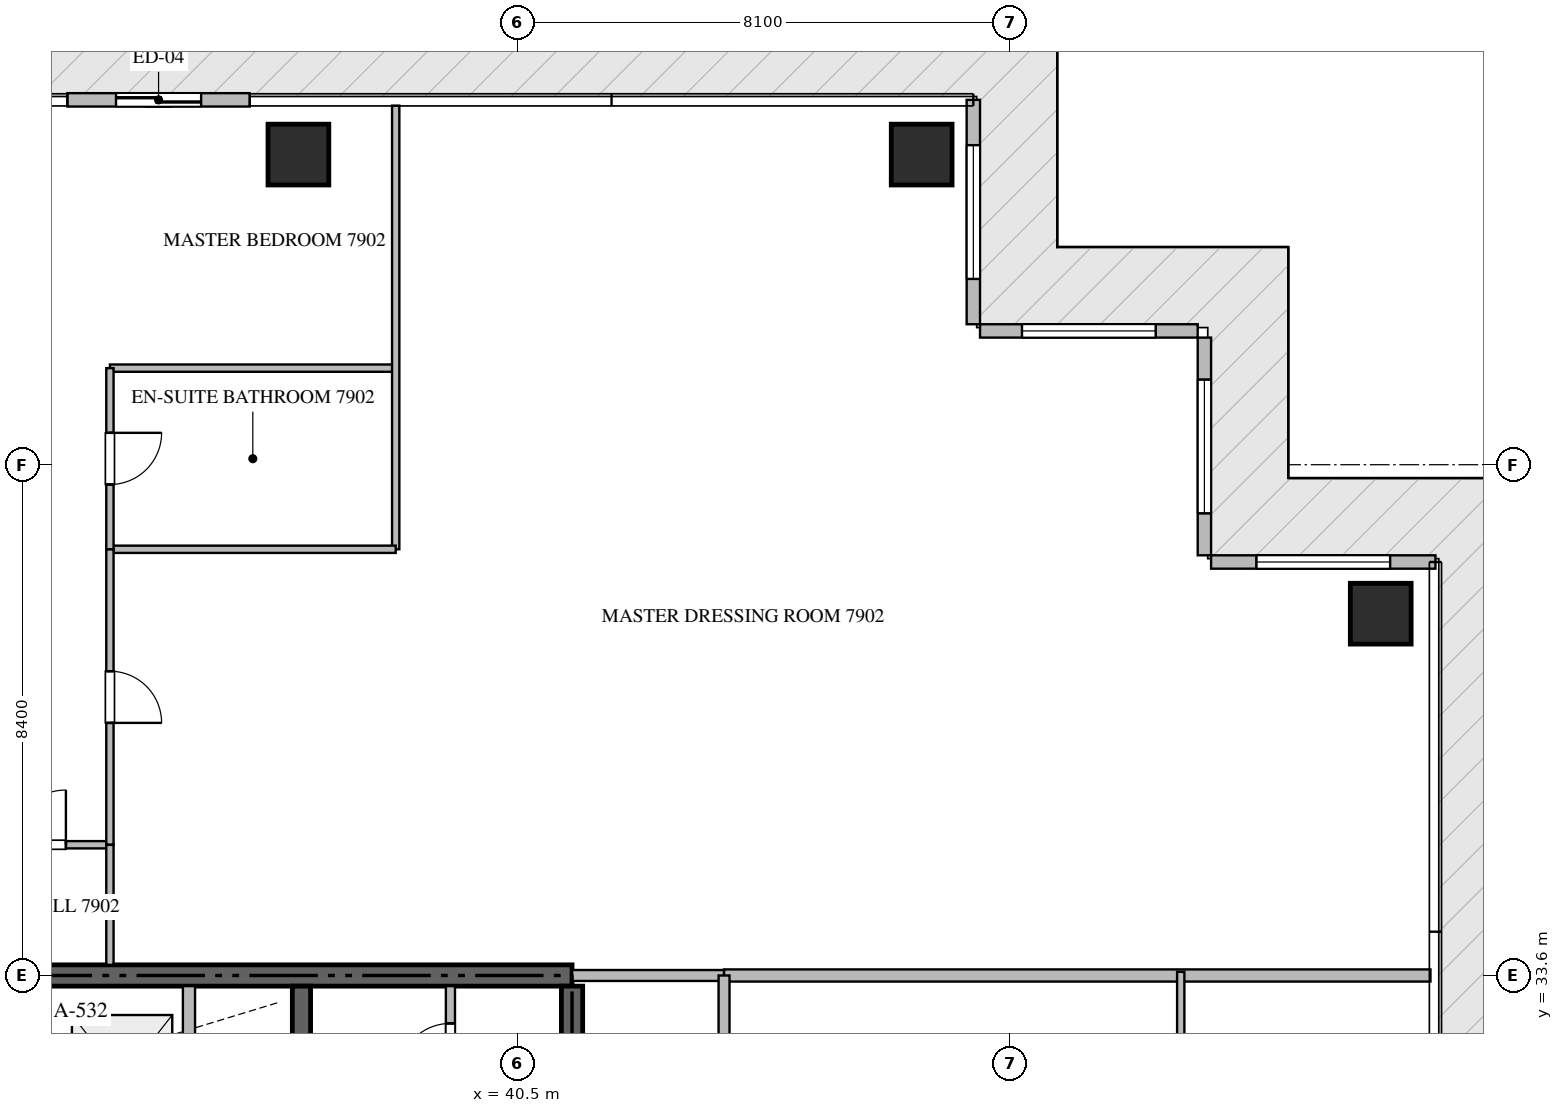
"""IFC4 building model, lengths in metres.
Left out: names, types, materials, properties, quantities, classifications, styles, units other than length and angle.
Written with IfcOpenShell. Run it as: python <this file> out.ifc"""

import sys

from ifc_helpers import new_model, si_unit, direction, frame, frame_2d, origin, origin_2d, place, context, subcontext, project, spatial, rectangle, extrude, source, transform, mapped, element, fill, save


model = new_model("IFC4")
c1 = context("Model", 3, precision=1e-05, world=origin(), true_north=direction((0.0, 1.0)))
c2 = subcontext(c1, "Body", "Model", "MODEL_VIEW")
j1 = project(units=[si_unit("LENGTHUNIT", "METRE"), si_unit("PLANEANGLEUNIT", "RADIAN")], contexts=[c1])
p1 = place(None, origin())
s1 = spatial("IfcSite", under=j1, at=p1, CompositionType="ELEMENT")
p2 = place(p1, origin())
s2 = spatial("IfcBuilding", under=s1, at=p2, CompositionType="ELEMENT")
p3 = place(p2, frame((0.0, 0.0, 317.75)))
s3 = spatial("IfcBuildingStorey", under=s2, at=p3, CompositionType="ELEMENT", Elevation=317.75)
p4 = place(p3, frame((41.4, 33.6, -0.26), z_axis=(0.0, 0.0, 1.0), x_axis=(-1.0, 0.0, 0.0)))
e1 = element("IfcWall", 1, at=p4, inside=s3, PredefinedType="SHEAR", context=c2, shape_type="SweptSolid", body=[
    extrude(rectangle(XDim=18.0, YDim=0.35, at=frame_2d((9.0, 0.0))), origin(), (0.0, 0.0, 1.0), 4.048),
])
p5 = place(p3, frame((41.4, 27.75, -0.26), z_axis=(0.0, 0.0, 1.0), x_axis=(0.0, 1.0, 0.0)))
e2 = element("IfcWall", 2, at=p5, inside=s3, PredefinedType="SHEAR", context=c2, shape_type="SweptSolid", body=[
    extrude(rectangle(XDim=5.675, YDim=0.35, at=frame_2d((2.837, 0.0))), origin(), (0.0, 0.0, 1.0), 4.048),
])
p6 = place(p3, frame((36.95, 27.05, -0.26), z_axis=(0.0, 0.0, 1.0), x_axis=(0.0, 1.0, 0.0)))
e3 = element("IfcWall", 3, at=p6, inside=s3, PredefinedType="SHEAR", context=c2, shape_type="SweptSolid", body=[
    extrude(rectangle(XDim=6.375, YDim=0.3, at=frame_2d((3.188, 0.0))), origin(), (0.0, 0.0, 1.0), 4.048),
])
m1 = source(origin(), c2, "Body", "SweptSolid", [
    extrude(rectangle(XDim=1.0, YDim=1.0, at=origin_2d()), origin(), (0.0, 0.0, 1.0), 4.05),
])
for number, where, z_axis, x_axis in (
    (4, (36.9, 47.1, -0.26), (0.0, 0.0, 1.0), (1.0, 0.0, 0.0)),
    (5, (47.15, 47.1, -0.26), (0.0, 0.0, 1.0), (1.0, 0.0, 0.0)),
    (6, (54.7, 39.55, -0.26), (0.0, 0.0, 1.0), (1.0, 0.0, 0.0)),
):
    element("IfcColumn", number, at=place(p3, frame(where, z_axis=z_axis, x_axis=x_axis)), inside=s3, PredefinedType="COLUMN", context=c2, shape_type="MappedRepresentation", body=[
        mapped(m1, transform((0.0, 0.0, 0.0), scale=1.0)),
    ])
p7 = place(p3, frame((55.6, 40.4, 0.0), z_axis=(0.0, 0.0, 1.0), x_axis=(-1.0, 0.0, 0.0)))
e7 = element("IfcWall", 7, at=p7, inside=s3, PredefinedType="ELEMENTEDWALL", context=c2, shape_type="SweptSolid", body=[
    extrude(rectangle(XDim=3.69, YDim=0.22, at=frame_2d((1.845, 0.0))), origin(), (0.0, 0.0, 1.0), 3.775),
])
p8 = place(p7, frame((0.745, 0.0, 0.65)))
e8 = element("IfcOpeningElement", 8, at=p8, cuts=e7, PredefinedType="OPENING", context=c2, shape_type="SweptSolid", body=[
    extrude(rectangle(XDim=2.2, YDim=2.4, at=frame_2d((1.1, 1.2))), frame((0.0, 0.12, 0.0), z_axis=(0.0, -1.0, 0.0), x_axis=(1.0, 0.0, 0.0)), (0.0, 0.0, 1.0), 0.24),
])
p9 = place(p3, frame((51.8, 40.51, 0.0), z_axis=(0.0, 0.0, 1.0), x_axis=(0.0, 1.0, 0.0)))
e9 = element("IfcWall", 9, at=p9, inside=s3, PredefinedType="ELEMENTEDWALL", context=c2, shape_type="SweptSolid", body=[
    extrude(rectangle(XDim=3.58, YDim=0.22, at=frame_2d((1.79, 0.0))), origin(), (0.0, 0.0, 1.0), 3.775),
])
p10 = place(p9, frame((0.69, 0.0, 0.65)))
e10 = element("IfcOpeningElement", 10, at=p10, cuts=e9, PredefinedType="OPENING", context=c2, shape_type="SweptSolid", body=[
    extrude(rectangle(XDim=2.2, YDim=2.4, at=frame_2d((1.1, 1.2))), frame((0.0, 0.12, 0.0), z_axis=(0.0, -1.0, 0.0), x_axis=(1.0, 0.0, 0.0)), (0.0, 0.0, 1.0), 0.24),
])
p11 = place(p3, frame((51.69, 44.2, 0.0), z_axis=(0.0, 0.0, 1.0), x_axis=(-1.0, 0.0, 0.0)))
e11 = element("IfcWall", 11, at=p11, inside=s3, PredefinedType="ELEMENTEDWALL", context=c2, shape_type="SweptSolid", body=[
    extrude(rectangle(XDim=3.58, YDim=0.22, at=frame_2d((1.79, 0.0))), origin(), (0.0, 0.0, 1.0), 3.775),
])
p12 = place(p11, frame((0.69, 0.0, 0.65)))
e12 = element("IfcOpeningElement", 12, at=p12, cuts=e11, PredefinedType="OPENING", context=c2, shape_type="SweptSolid", body=[
    extrude(rectangle(XDim=2.2, YDim=2.4, at=frame_2d((1.1, 1.2))), frame((0.0, 0.12, 0.0), z_axis=(0.0, -1.0, 0.0), x_axis=(1.0, 0.0, 0.0)), (0.0, 0.0, 1.0), 0.24),
])
p13 = place(p3, frame((48.0, 44.31, 0.0), z_axis=(0.0, 0.0, 1.0), x_axis=(0.0, 1.0, 0.0)))
e13 = element("IfcWall", 13, at=p13, inside=s3, PredefinedType="ELEMENTEDWALL", context=c2, shape_type="SweptSolid", body=[
    extrude(rectangle(XDim=3.69, YDim=0.22, at=frame_2d((1.845, 0.0))), origin(), (0.0, 0.0, 1.0), 3.775),
])
p14 = place(p13, frame((0.745, 0.0, 0.65)))
e14 = element("IfcOpeningElement", 14, at=p14, cuts=e13, PredefinedType="OPENING", context=c2, shape_type="SweptSolid", body=[
    extrude(rectangle(XDim=2.2, YDim=2.4, at=frame_2d((1.1, 1.2))), frame((0.0, 0.12, 0.0), z_axis=(0.0, -1.0, 0.0), x_axis=(1.0, 0.0, 0.0)), (0.0, 0.0, 1.0), 0.24),
])
p15 = place(p3, frame((36.1, 48.0, 0.0), z_axis=(0.0, 0.0, 1.0), x_axis=(-1.0, 0.0, 0.0)))
e15 = element("IfcWall", 15, at=p15, inside=s3, PredefinedType="ELEMENTEDWALL", context=c2, shape_type="SweptSolid", body=[
    extrude(rectangle(XDim=3.0, YDim=0.22, at=frame_2d((1.5, 0.0))), origin(), (0.0, 0.0, 1.0), 3.775),
])
p16 = place(p15, frame((0.8, 0.0, 0.0)))
e16 = element("IfcOpeningElement", 16, at=p16, cuts=e15, PredefinedType="OPENING", context=c2, shape_type="SweptSolid", body=[
    extrude(rectangle(XDim=1.4, YDim=2.25, at=frame_2d((0.7, 1.125))), frame((0.0, 0.12, 0.0), z_axis=(0.0, -1.0, 0.0), x_axis=(1.0, 0.0, 0.0)), (0.0, 0.0, 1.0), 0.24),
])
p17 = place(p3, frame((35.1, 30.75, 0.0), z_axis=(0.0, 0.0, 1.0), x_axis=(0.0, 1.0, 0.0)))
e17 = element("IfcWall", 17, at=p17, inside=s3, PredefinedType="STANDARD", context=c2, shape_type="SweptSolid", body=[
    extrude(rectangle(XDim=2.675, YDim=0.2, at=frame_2d((1.337, 0.0))), origin(), (0.0, 0.0, 1.0), 3.79),
])
p18 = place(p3, frame((39.4, 31.35, 0.0), z_axis=(0.0, 0.0, 1.0), x_axis=(0.0, 1.0, 0.0)))
e18 = element("IfcWall", 18, at=p18, inside=s3, PredefinedType="PARTITIONING", context=c2, shape_type="SweptSolid", body=[
    extrude(rectangle(XDim=2.075, YDim=0.15, at=frame_2d((1.038, 0.0))), origin(), (0.0, 0.0, 1.0), 3.79),
])
p19 = place(p18, frame((0.612, 0.0, 0.0)))
e19 = element("IfcOpeningElement", 19, at=p19, cuts=e18, PredefinedType="OPENING", context=c2, shape_type="SweptSolid", body=[
    extrude(rectangle(XDim=0.85, YDim=2.1, at=frame_2d((0.425, 1.05))), frame((0.0, 0.085, 0.0), z_axis=(0.0, -1.0, 0.0), x_axis=(1.0, 0.0, 0.0)), (0.0, 0.0, 1.0), 0.17),
])
p20 = place(p3, frame((43.9, 33.6, 0.0), z_axis=(0.0, 0.0, 1.0), x_axis=(1.0, 0.0, 0.0)))
e20 = element("IfcWall", 20, at=p20, inside=s3, PredefinedType="PARTITIONING", context=c2, shape_type="SweptSolid", body=[
    extrude(rectangle(XDim=11.618, YDim=0.2, at=frame_2d((5.809, 0.0))), origin(), (0.0, 0.0, 1.0), 3.79),
])
p21 = place(p3, frame((41.402, 33.6, 0.0), z_axis=(0.0, 0.0, 1.0), x_axis=(1.0, 0.0, 0.0)))
e21 = element("IfcWall", 21, at=p21, inside=s3, PredefinedType="PARTITIONING", context=c2, shape_type="SweptSolid", body=[
    extrude(rectangle(XDim=2.496, YDim=0.18, at=frame_2d((1.248, 0.0))), origin(), (0.0, 0.0, 1.0), 3.79),
])
p22 = place(p3, frame((43.9, 16.8, 0.0), z_axis=(0.0, 0.0, 1.0), x_axis=(0.0, 1.0, 0.0)))
e22 = element("IfcWall", 22, at=p22, inside=s3, PredefinedType="PARTITIONING", context=c2, shape_type="SweptSolid", body=[
    extrude(rectangle(XDim=16.8, YDim=0.18, at=frame_2d((8.4, 0.0))), origin(), (0.0, 0.0, 1.0), 3.79),
])
p23 = place(p22, frame((1.3, 0.0, 0.0)))
e23 = element("IfcOpeningElement", 23, at=p23, cuts=e22, PredefinedType="OPENING", context=c2, shape_type="SweptSolid", body=[
    extrude(rectangle(XDim=1.0, YDim=2.15, at=frame_2d((0.5, 1.075))), frame((0.0, 0.1, 0.0), z_axis=(0.0, -1.0, 0.0), x_axis=(1.0, 0.0, 0.0)), (0.0, 0.0, 1.0), 0.2),
])
p24 = place(p3, frame((31.452, 35.75, 0.0), z_axis=(0.0, 0.0, 1.0), x_axis=(1.0, 0.0, 0.0)))
e24 = element("IfcWall", 24, at=p24, inside=s3, PredefinedType="PARTITIONING", context=c2, shape_type="SweptSolid", body=[
    extrude(rectangle(XDim=2.348, YDim=0.12, at=frame_2d((1.174, 0.0))), origin(), (0.0, 0.0, 1.0), 3.79),
])
p25 = place(p24, frame((0.724, 0.0, 0.0)))
e25 = element("IfcOpeningElement", 25, at=p25, cuts=e24, PredefinedType="OPENING", context=c2, shape_type="SweptSolid", body=[
    extrude(rectangle(XDim=0.9, YDim=2.1, at=frame_2d((0.45, 1.05))), frame((0.0, 0.07, 0.0), z_axis=(0.0, -1.0, 0.0), x_axis=(1.0, 0.0, 0.0)), (0.0, 0.0, 1.0), 0.14),
])
p26 = place(p3, frame((33.8, 43.588, 0.0), z_axis=(0.0, 0.0, 1.0), x_axis=(1.0, 0.0, 0.0)))
e26 = element("IfcWall", 26, at=p26, inside=s3, PredefinedType="PARTITIONING", context=c2, shape_type="SweptSolid", body=[
    extrude(rectangle(XDim=4.7, YDim=0.12, at=frame_2d((2.35, 0.0))), origin(), (0.0, 0.0, 1.0), 3.79),
])
p27 = place(p3, frame((38.5, 47.905, 0.0), z_axis=(0.0, 0.0, 1.0), x_axis=(0.0, -1.0, 0.0)))
e27 = element("IfcWall", 27, at=p27, inside=s3, PredefinedType="PARTITIONING", context=c2, shape_type="SweptSolid", body=[
    extrude(rectangle(XDim=7.296, YDim=0.12, at=frame_2d((3.648, 0.0))), origin(), (0.0, 0.0, 1.0), 3.79),
])
p28 = place(p3, frame((33.8, 40.609, 0.0), z_axis=(0.0, 0.0, 1.0), x_axis=(1.0, 0.0, 0.0)))
e28 = element("IfcWall", 28, at=p28, inside=s3, PredefinedType="PARTITIONING", context=c2, shape_type="SweptSolid", body=[
    extrude(rectangle(XDim=4.7, YDim=0.12, at=frame_2d((2.35, 0.0))), origin(), (0.0, 0.0, 1.0), 3.79),
])
p29 = place(p3, frame((33.8, 43.588, 0.0), z_axis=(0.0, 0.0, 1.0), x_axis=(0.0, -1.0, 0.0)))
e29 = element("IfcWall", 29, at=p29, inside=s3, PredefinedType="PARTITIONING", context=c2, shape_type="SweptSolid", body=[
    extrude(rectangle(XDim=2.979, YDim=0.12, at=frame_2d((1.49, 0.0))), origin(), (0.0, 0.0, 1.0), 3.79),
])
p30 = place(p29, frame((1.064, 0.0, 0.0)))
e30 = element("IfcOpeningElement", 30, at=p30, cuts=e29, PredefinedType="OPENING", context=c2, shape_type="SweptSolid", body=[
    extrude(rectangle(XDim=0.85, YDim=2.1, at=frame_2d((0.425, 1.05))), frame((0.0, 0.07, 0.0), z_axis=(0.0, -1.0, 0.0), x_axis=(1.0, 0.0, 0.0)), (0.0, 0.0, 1.0), 0.14),
])
p31 = place(p3, frame((33.8, 40.607, 0.0), z_axis=(0.0, 0.0, 1.0), x_axis=(0.0, -1.0, 0.0)))
e31 = element("IfcWall", 31, at=p31, inside=s3, PredefinedType="PARTITIONING", context=c2, shape_type="SweptSolid", body=[
    extrude(rectangle(XDim=4.857, YDim=0.12, at=frame_2d((2.428, 0.0))), origin(), (0.0, 0.0, 1.0), 3.79),
])
p32 = place(p31, frame((2.003, 0.0, 0.0)))
e32 = element("IfcOpeningElement", 32, at=p32, cuts=e31, PredefinedType="OPENING", context=c2, shape_type="SweptSolid", body=[
    extrude(rectangle(XDim=0.85, YDim=2.1, at=frame_2d((0.425, 1.05))), frame((0.0, 0.07, 0.0), z_axis=(0.0, -1.0, 0.0), x_axis=(1.0, 0.0, 0.0)), (0.0, 0.0, 1.0), 0.14),
])
p33 = place(p3, frame((33.8, 35.748, 0.0), z_axis=(0.0, 0.0, 1.0), x_axis=(0.0, -1.0, 0.0)))
e33 = element("IfcWall", 33, at=p33, inside=s3, PredefinedType="PARTITIONING", context=c2, shape_type="SweptSolid", body=[
    extrude(rectangle(XDim=1.973, YDim=0.12, at=frame_2d((0.987, 0.0))), origin(), (0.0, 0.0, 1.0), 3.79),
])
p34 = place(p3, frame((51.411, 23.18, 0.0), z_axis=(0.0, 0.0, 1.0), x_axis=(0.0, 1.0, 0.0)))
e34 = element("IfcWall", 34, at=p34, inside=s3, PredefinedType="PARTITIONING", context=c2, shape_type="SweptSolid", body=[
    extrude(rectangle(XDim=10.48, YDim=0.12, at=frame_2d((5.24, 0.0))), origin(), (0.0, 0.0, 1.0), 3.79),
])
m2 = source(origin(), c2, "Body", "SweptSolid", [
    extrude(rectangle(XDim=2.2, YDim=2.4, at=frame_2d((1.1, 1.2))), frame((0.0, 0.03, 0.0), z_axis=(0.0, -1.0, 0.0), x_axis=(1.0, 0.0, 0.0)), (0.0, 0.0, 1.0), 0.06),
])
p35 = place(p8, origin())
e35 = element("IfcWindow", 35, at=p35, inside=s3, PartitioningType="SINGLE_PANEL", PredefinedType="WINDOW", context=c2, shape_type="MappedRepresentation", body=[
    mapped(m2, transform((0.0, 0.0, 0.0), scale=1.0)),
])
fill(e8, e35)
p36 = place(p10, origin())
e36 = element("IfcWindow", 36, at=p36, inside=s3, PartitioningType="SINGLE_PANEL", PredefinedType="WINDOW", context=c2, shape_type="MappedRepresentation", body=[
    mapped(m2, transform((0.0, 0.0, 0.0), scale=1.0)),
])
fill(e10, e36)
p37 = place(p12, origin())
e37 = element("IfcWindow", 37, at=p37, inside=s3, PartitioningType="SINGLE_PANEL", PredefinedType="WINDOW", context=c2, shape_type="MappedRepresentation", body=[
    mapped(m2, transform((0.0, 0.0, 0.0), scale=1.0)),
])
fill(e12, e37)
p38 = place(p14, origin())
e38 = element("IfcWindow", 38, at=p38, inside=s3, PartitioningType="SINGLE_PANEL", PredefinedType="WINDOW", context=c2, shape_type="MappedRepresentation", body=[
    mapped(m2, transform((0.0, 0.0, 0.0), scale=1.0)),
])
fill(e14, e38)
m3 = source(origin(), c2, "Body", "SweptSolid", [
    extrude(rectangle(XDim=1.4, YDim=2.25, at=frame_2d((0.7, 1.125))), frame((0.0, 0.025, 0.0), z_axis=(0.0, -1.0, 0.0), x_axis=(1.0, 0.0, 0.0)), (0.0, 0.0, 1.0), 0.05),
])
p39 = place(p16, origin())
e39 = element("IfcDoor", 39, at=p39, inside=s3, OperationType="SLIDING_TO_LEFT", PredefinedType="DOOR", context=c2, shape_type="MappedRepresentation", body=[
    mapped(m3, transform((0.0, 0.0, 0.0), scale=1.0)),
])
fill(e16, e39)
m4 = source(origin(), c2, "Body", "SweptSolid", [
    extrude(rectangle(XDim=0.85, YDim=2.1, at=frame_2d((0.425, 1.05))), frame((0.0, 0.025, 0.0), z_axis=(0.0, -1.0, 0.0), x_axis=(1.0, 0.0, 0.0)), (0.0, 0.0, 1.0), 0.05),
])
p40 = place(p19, origin())
e40 = element("IfcDoor", 40, at=p40, inside=s3, OperationType="SINGLE_SWING_LEFT", PredefinedType="DOOR", context=c2, shape_type="MappedRepresentation", body=[
    mapped(m4, transform((0.0, 0.0, 0.0), scale=1.0)),
])
fill(e19, e40)
m5 = source(origin(), c2, "Body", "SweptSolid", [
    extrude(rectangle(XDim=0.9, YDim=2.1, at=frame_2d((0.45, 1.05))), frame((0.0, 0.025, 0.0), z_axis=(0.0, -1.0, 0.0), x_axis=(1.0, 0.0, 0.0)), (0.0, 0.0, 1.0), 0.05),
])
p41 = place(p25, origin())
e41 = element("IfcDoor", 41, at=p41, inside=s3, OperationType="SINGLE_SWING_RIGHT", PredefinedType="DOOR", context=c2, shape_type="MappedRepresentation", body=[
    mapped(m5, transform((0.0, 0.0, 0.0), scale=1.0)),
])
fill(e25, e41)
p42 = place(p30, origin())
e42 = element("IfcDoor", 42, at=p42, inside=s3, OperationType="SINGLE_SWING_LEFT", PredefinedType="DOOR", context=c2, shape_type="MappedRepresentation", body=[
    mapped(m4, transform((0.0, 0.0, 0.0), scale=1.0)),
])
fill(e30, e42)
p43 = place(p32, origin())
e43 = element("IfcDoor", 43, at=p43, inside=s3, OperationType="SINGLE_SWING_RIGHT", PredefinedType="DOOR", context=c2, shape_type="MappedRepresentation", body=[
    mapped(m4, transform((0.0, 0.0, 0.0), scale=1.0)),
])
fill(e32, e43)
save(model, sys.argv[1])
